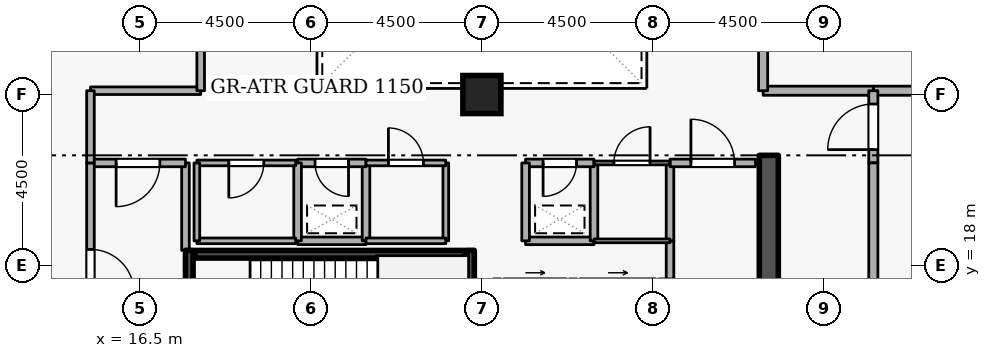
"""IFC4 building model, lengths in metres.
Left out: names, types, materials, properties, quantities, classifications, styles, units other than length and angle.
Written with IfcOpenShell. Run it as: python <this file> out.ifc"""

import sys

from ifc_helpers import new_model, si_unit, direction, frame, frame_2d, origin, origin_2d, place, context, subcontext, project, spatial, rectangle, extrude, element, fill, save


model = new_model("IFC4")
c1 = context("Model", 3, precision=1e-05, world=origin(), true_north=direction((0.0, 1.0)))
c2 = subcontext(c1, "Body", "Model", "MODEL_VIEW")
j1 = project(units=[si_unit("LENGTHUNIT", "METRE"), si_unit("PLANEANGLEUNIT", "RADIAN")], contexts=[c1])
p1 = place(None, origin())
s1 = spatial("IfcSite", under=j1, at=p1, CompositionType="ELEMENT")
p2 = place(p1, origin())
s2 = spatial("IfcBuilding", under=s1, at=p2, CompositionType="ELEMENT")
p3 = place(p2, frame((0.0, 0.0, 221.7)))
s3 = spatial("IfcBuildingStorey", under=s2, at=p3, CompositionType="ELEMENT", Elevation=221.7)
p4 = place(p3, frame((33.05, 15.1, 0.0), z_axis=(0.0, 0.0, 1.0), x_axis=(0.0, 1.0, 0.0)))
e1 = element("IfcWall", 1, at=p4, inside=s3, PredefinedType="SHEAR", context=c2, shape_type="SweptSolid", body=[
    extrude(rectangle(XDim=5.8, YDim=0.5, at=frame_2d((2.9, 0.0))), origin(), (0.0, 0.0, 1.0), 4.2),
])
p5 = place(p3, frame((25.5, 22.5, 0.0), z_axis=(0.0, 0.0, 1.0), x_axis=(1.0, 0.0, 0.0)))
e2 = element("IfcColumn", 2, at=p5, inside=s3, PredefinedType="COLUMN", context=c2, shape_type="SweptSolid", body=[
    extrude(rectangle(XDim=1.0, YDim=1.0, at=origin_2d()), origin(), (0.0, 0.0, 1.0), 4.2),
])
p6 = place(p3, frame((26.08, 17.55, 0.0), z_axis=(0.0, 0.0, 1.0), x_axis=(1.0, 0.0, 0.0)))
e3 = element("IfcWall", 3, at=p6, inside=s3, PredefinedType="STANDARD", context=c2, shape_type="SweptSolid", body=[
    extrude(rectangle(XDim=1.64, YDim=0.2, at=frame_2d((0.82, 0.0))), origin(), (0.0, 0.0, 1.0), 3.94),
])
p7 = place(p6, frame((0.31, 0.0, 0.0)))
e4 = element("IfcOpeningElement", 4, at=p7, cuts=e3, PredefinedType="OPENING", context=c2, shape_type="SweptSolid", body=[
    extrude(rectangle(XDim=1.02, YDim=2.06, at=frame_2d((0.51, 1.03))), frame((0.0, 0.11, 0.0), z_axis=(0.0, -1.0, 0.0), x_axis=(1.0, 0.0, 0.0)), (0.0, 0.0, 1.0), 0.22),
])
p8 = place(p3, frame((28.08, 17.55, 0.0), z_axis=(0.0, 0.0, 1.0), x_axis=(1.0, 0.0, 0.0)))
e5 = element("IfcWall", 5, at=p8, inside=s3, PredefinedType="STANDARD", context=c2, shape_type="SweptSolid", body=[
    extrude(rectangle(XDim=1.99, YDim=0.2, at=frame_2d((0.995, 0.0))), origin(), (0.0, 0.0, 1.0), 3.94),
])
p9 = place(p8, frame((0.485, 0.0, 0.0)))
e6 = element("IfcOpeningElement", 6, at=p9, cuts=e5, PredefinedType="OPENING", context=c2, shape_type="SweptSolid", body=[
    extrude(rectangle(XDim=1.02, YDim=2.06, at=frame_2d((0.51, 1.03))), frame((0.0, 0.11, 0.0), z_axis=(0.0, -1.0, 0.0), x_axis=(1.0, 0.0, 0.0)), (0.0, 0.0, 1.0), 0.22),
])
p10 = place(p3, frame((17.8, 15.05, 0.0), z_axis=(0.0, 0.0, 1.0), x_axis=(0.0, 1.0, 0.0)))
e7 = element("IfcWall", 7, at=p10, inside=s3, PredefinedType="SHEAR", context=c2, shape_type="SweptSolid", body=[
    extrude(rectangle(XDim=3.35, YDim=0.2, at=frame_2d((1.675, 0.0))), origin(), (0.0, 0.0, 1.0), 4.2),
])
p11 = place(p10, frame((1.125, 0.0, 0.0)))
e8 = element("IfcOpeningElement", 8, at=p11, cuts=e7, PredefinedType="OPENING", context=c2, shape_type="SweptSolid", body=[
    extrude(rectangle(XDim=1.1, YDim=2.1, at=frame_2d((0.55, 1.05))), frame((0.0, 0.11, 0.0), z_axis=(0.0, -1.0, 0.0), x_axis=(1.0, 0.0, 0.0)), (0.0, 0.0, 1.0), 0.22),
])
p12 = place(p3, frame((25.2, 18.4, 0.0), z_axis=(0.0, 0.0, 1.0), x_axis=(0.0, -1.0, 0.0)))
e9 = element("IfcWall", 9, at=p12, inside=s3, PredefinedType="SHEAR", context=c2, shape_type="SweptSolid", body=[
    extrude(rectangle(XDim=3.35, YDim=0.2, at=frame_2d((1.675, 0.0))), origin(), (0.0, 0.0, 1.0), 4.2),
])
p13 = place(p3, frame((25.05, 18.297, 0.0), z_axis=(0.0, 0.0, 1.0), x_axis=(-1.0, 0.0, 0.0)))
e10 = element("IfcWall", 10, at=p13, inside=s3, PredefinedType="SHEAR", context=c2, shape_type="SweptSolid", body=[
    extrude(rectangle(XDim=7.1, YDim=0.2, at=frame_2d((3.55, 0.0))), origin(), (0.0, 0.0, 1.0), 4.2),
])
p14 = place(p3, frame((17.7, 18.4, 0.0), z_axis=(0.0, 0.0, 1.0), x_axis=(0.0, 1.0, 0.0)))
e11 = element("IfcWall", 11, at=p14, inside=s3, PredefinedType="STANDARD", context=c2, shape_type="SweptSolid", body=[
    extrude(rectangle(XDim=2.3, YDim=0.2, at=frame_2d((1.15, 0.0))), origin(), (0.0, 0.0, 1.0), 3.145),
])
p15 = place(p3, frame((17.7, 20.7, 0.0), z_axis=(0.0, 0.0, 1.0), x_axis=(-1.0, 0.0, 0.0)))
e12 = element("IfcWall", 12, at=p15, inside=s3, PredefinedType="STANDARD", context=c2, shape_type="SweptSolid", body=[
    extrude(rectangle(XDim=2.5, YDim=0.2, at=frame_2d((1.25, 0.0))), origin(), (0.0, 0.0, 1.0), 3.94),
])
p16 = place(p15, frame((0.675, 0.0, 0.0)))
e13 = element("IfcOpeningElement", 13, at=p16, cuts=e12, PredefinedType="OPENING", context=c2, shape_type="SweptSolid", body=[
    extrude(rectangle(XDim=1.15, YDim=2.1, at=frame_2d((0.575, 1.05))), frame((0.0, 0.11, 0.0), z_axis=(0.0, -1.0, 0.0), x_axis=(1.0, 0.0, 0.0)), (0.0, 0.0, 1.0), 0.22),
])
p17 = place(p3, frame((15.2, 20.7, 0.0), z_axis=(0.0, 0.0, 1.0), x_axis=(0.0, -1.0, 0.0)))
e14 = element("IfcWall", 14, at=p17, inside=s3, PredefinedType="STANDARD", context=c2, shape_type="SweptSolid", body=[
    extrude(rectangle(XDim=5.7, YDim=0.2, at=frame_2d((2.85, 0.0))), origin(), (0.0, 0.0, 1.0), 3.94),
])
p18 = place(p17, frame((2.275, 0.0, 0.0)))
e15 = element("IfcOpeningElement", 15, at=p18, cuts=e14, PredefinedType="OPENING", context=c2, shape_type="SweptSolid", body=[
    extrude(rectangle(XDim=1.15, YDim=2.1, at=frame_2d((0.575, 1.05))), frame((0.0, 0.11, 0.0), z_axis=(0.0, -1.0, 0.0), x_axis=(1.0, 0.0, 0.0)), (0.0, 0.0, 1.0), 0.22),
])
p19 = place(p3, frame((26.65, 18.65, 0.0), z_axis=(0.0, 0.0, 1.0), x_axis=(1.0, 0.0, 0.0)))
e16 = element("IfcWall", 16, at=p19, inside=s3, PredefinedType="STANDARD", context=c2, shape_type="SweptSolid", body=[
    extrude(rectangle(XDim=1.8, YDim=0.2, at=frame_2d((0.9, 0.0))), origin(), (0.0, 0.0, 1.0), 3.94),
])
p20 = place(p3, frame((28.45, 18.65, 0.0), z_axis=(0.0, 0.0, 1.0), x_axis=(0.0, 1.0, 0.0)))
e17 = element("IfcWall", 17, at=p20, inside=s3, PredefinedType="STANDARD", context=c2, shape_type="SweptSolid", body=[
    extrude(rectangle(XDim=2.05, YDim=0.2, at=frame_2d((1.025, 0.0))), origin(), (0.0, 0.0, 1.0), 3.94),
])
p21 = place(p3, frame((28.45, 20.7, 0.0), z_axis=(0.0, 0.0, 1.0), x_axis=(-1.0, 0.0, 0.0)))
e18 = element("IfcWall", 18, at=p21, inside=s3, PredefinedType="STANDARD", context=c2, shape_type="SweptSolid", body=[
    extrude(rectangle(XDim=1.8, YDim=0.2, at=frame_2d((0.9, 0.0))), origin(), (0.0, 0.0, 1.0), 3.94),
])
p22 = place(p21, frame((0.46, 0.0, 0.0)))
e19 = element("IfcOpeningElement", 19, at=p22, cuts=e18, PredefinedType="OPENING", context=c2, shape_type="SweptSolid", body=[
    extrude(rectangle(XDim=0.88, YDim=2.04, at=frame_2d((0.44, 1.02))), frame((0.0, 0.11, 0.0), z_axis=(0.0, -1.0, 0.0), x_axis=(1.0, 0.0, 0.0)), (0.0, 0.0, 1.0), 0.22),
])
p23 = place(p3, frame((26.65, 20.7, 0.0), z_axis=(0.0, 0.0, 1.0), x_axis=(0.0, -1.0, 0.0)))
e20 = element("IfcWall", 20, at=p23, inside=s3, PredefinedType="STANDARD", context=c2, shape_type="SweptSolid", body=[
    extrude(rectangle(XDim=2.05, YDim=0.2, at=frame_2d((1.025, 0.0))), origin(), (0.0, 0.0, 1.0), 3.94),
])
p24 = place(p3, frame((20.65, 18.65, 0.0), z_axis=(0.0, 0.0, 1.0), x_axis=(1.0, 0.0, 0.0)))
e21 = element("IfcWall", 21, at=p24, inside=s3, PredefinedType="STANDARD", context=c2, shape_type="SweptSolid", body=[
    extrude(rectangle(XDim=1.8, YDim=0.2, at=frame_2d((0.9, 0.0))), origin(), (0.0, 0.0, 1.0), 3.94),
])
p25 = place(p3, frame((22.45, 18.65, 0.0), z_axis=(0.0, 0.0, 1.0), x_axis=(0.0, 1.0, 0.0)))
e22 = element("IfcWall", 22, at=p25, inside=s3, PredefinedType="STANDARD", context=c2, shape_type="SweptSolid", body=[
    extrude(rectangle(XDim=2.05, YDim=0.2, at=frame_2d((1.025, 0.0))), origin(), (0.0, 0.0, 1.0), 3.94),
])
p26 = place(p3, frame((22.45, 20.7, 0.0), z_axis=(0.0, 0.0, 1.0), x_axis=(-1.0, 0.0, 0.0)))
e23 = element("IfcWall", 23, at=p26, inside=s3, PredefinedType="STANDARD", context=c2, shape_type="SweptSolid", body=[
    extrude(rectangle(XDim=1.8, YDim=0.2, at=frame_2d((0.9, 0.0))), origin(), (0.0, 0.0, 1.0), 3.94),
])
p27 = place(p26, frame((0.46, 0.0, 0.0)))
e24 = element("IfcOpeningElement", 24, at=p27, cuts=e23, PredefinedType="OPENING", context=c2, shape_type="SweptSolid", body=[
    extrude(rectangle(XDim=0.88, YDim=2.04, at=frame_2d((0.44, 1.02))), frame((0.0, 0.11, 0.0), z_axis=(0.0, -1.0, 0.0), x_axis=(1.0, 0.0, 0.0)), (0.0, 0.0, 1.0), 0.22),
])
p28 = place(p3, frame((20.65, 20.7, 0.0), z_axis=(0.0, 0.0, 1.0), x_axis=(0.0, -1.0, 0.0)))
e25 = element("IfcWall", 25, at=p28, inside=s3, PredefinedType="STANDARD", context=c2, shape_type="SweptSolid", body=[
    extrude(rectangle(XDim=2.05, YDim=0.2, at=frame_2d((1.025, 0.0))), origin(), (0.0, 0.0, 1.0), 3.94),
])
p29 = place(p3, frame((30.45, 17.648, 0.0), z_axis=(0.0, 0.0, 1.0), x_axis=(0.0, 1.0, 0.0)))
e26 = element("IfcWall", 26, at=p29, inside=s3, PredefinedType="STANDARD", context=c2, shape_type="SweptSolid", body=[
    extrude(rectangle(XDim=1.002, YDim=0.2, at=frame_2d((0.501, 0.0))), origin(), (0.0, 0.0, 1.0), 3.94),
])
p30 = place(p3, frame((30.45, 18.65, 0.0), z_axis=(0.0, 0.0, 1.0), x_axis=(0.0, 1.0, 0.0)))
e27 = element("IfcWall", 27, at=p30, inside=s3, PredefinedType="STANDARD", context=c2, shape_type="SweptSolid", body=[
    extrude(rectangle(XDim=2.05, YDim=0.2, at=frame_2d((1.025, 0.0))), origin(), (0.0, 0.0, 1.0), 3.94),
])
p31 = place(p3, frame((30.45, 20.7, 0.0), z_axis=(0.0, 0.0, 1.0), x_axis=(1.0, 0.0, 0.0)))
e28 = element("IfcWall", 28, at=p31, inside=s3, PredefinedType="STANDARD", context=c2, shape_type="SweptSolid", body=[
    extrude(rectangle(XDim=2.25, YDim=0.2, at=frame_2d((1.125, 0.0))), origin(), (0.0, 0.0, 1.0), 3.94),
])
p32 = place(p31, frame((0.55, 0.0, 0.0)))
e29 = element("IfcOpeningElement", 29, at=p32, cuts=e28, PredefinedType="OPENING", context=c2, shape_type="SweptSolid", body=[
    extrude(rectangle(XDim=1.15, YDim=2.1, at=frame_2d((0.575, 1.05))), frame((0.0, 0.11, 0.0), z_axis=(0.0, -1.0, 0.0), x_axis=(1.0, 0.0, 0.0)), (0.0, 0.0, 1.0), 0.22),
])
p33 = place(p3, frame((39.55, 22.6, 0.0), z_axis=(0.0, 0.0, 1.0), x_axis=(-1.0, 0.0, 0.0)))
e30 = element("IfcWall", 30, at=p33, inside=s3, PredefinedType="STANDARD", context=c2, shape_type="SweptSolid", body=[
    extrude(rectangle(XDim=3.75, YDim=0.24, at=frame_2d((1.875, 0.0))), origin(), (0.0, 0.0, 1.0), 3.94),
])
p34 = place(p3, frame((35.8, 22.6, 0.0), z_axis=(0.0, 0.0, 1.0), x_axis=(-1.0, 0.0, 0.0)))
e31 = element("IfcWall", 31, at=p34, inside=s3, PredefinedType="STANDARD", context=c2, shape_type="SweptSolid", body=[
    extrude(rectangle(XDim=2.9, YDim=0.24, at=frame_2d((1.45, 0.0))), origin(), (0.0, 0.0, 1.0), 3.94),
])
p35 = place(p3, frame((32.9, 22.6, 0.0), z_axis=(0.0, 0.0, 1.0), x_axis=(0.0, 1.0, 0.0)))
e32 = element("IfcWall", 32, at=p35, inside=s3, PredefinedType="STANDARD", context=c2, shape_type="SweptSolid", body=[
    extrude(rectangle(XDim=5.12, YDim=0.24, at=frame_2d((2.56, 0.0))), origin(), (0.0, 0.0, 1.0), 3.145),
])
p36 = place(p3, frame((18.1, 22.6, 0.0), z_axis=(0.0, 0.0, 1.0), x_axis=(-1.0, 0.0, 0.0)))
e33 = element("IfcWall", 33, at=p36, inside=s3, PredefinedType="STANDARD", context=c2, shape_type="SweptSolid", body=[
    extrude(rectangle(XDim=2.9, YDim=0.2, at=frame_2d((1.45, 0.0))), origin(), (0.0, 0.0, 1.0), 3.94),
])
p37 = place(p3, frame((15.2, 22.6, 0.0), z_axis=(0.0, 0.0, 1.0), x_axis=(0.0, -1.0, 0.0)))
e34 = element("IfcWall", 34, at=p37, inside=s3, PredefinedType="STANDARD", context=c2, shape_type="SweptSolid", body=[
    extrude(rectangle(XDim=1.9, YDim=0.2, at=frame_2d((0.95, 0.0))), origin(), (0.0, 0.0, 1.0), 3.94),
])
p38 = place(p3, frame((18.1, 27.0, 0.0), z_axis=(0.0, 0.0, 1.0), x_axis=(0.0, -1.0, 0.0)))
e35 = element("IfcWall", 35, at=p38, inside=s3, PredefinedType="STANDARD", context=c2, shape_type="SweptSolid", body=[
    extrude(rectangle(XDim=4.4, YDim=0.2, at=frame_2d((2.2, 0.0))), origin(), (0.0, 0.0, 1.0), 3.145),
])
p39 = place(p3, frame((35.8, 20.7, 0.0), z_axis=(0.0, 0.0, 1.0), x_axis=(0.0, 1.0, 0.0)))
e36 = element("IfcWall", 36, at=p39, inside=s3, PredefinedType="STANDARD", context=c2, shape_type="SweptSolid", body=[
    extrude(rectangle(XDim=1.9, YDim=0.24, at=frame_2d((0.95, 0.0))), origin(), (0.0, 0.0, 1.0), 3.94),
])
p40 = place(p39, frame((0.35, 0.0, 0.0)))
e37 = element("IfcOpeningElement", 37, at=p40, cuts=e36, PredefinedType="OPENING", context=c2, shape_type="SweptSolid", body=[
    extrude(rectangle(XDim=1.2, YDim=2.1, at=frame_2d((0.6, 1.05))), frame((0.0, 0.13, 0.0), z_axis=(0.0, -1.0, 0.0), x_axis=(1.0, 0.0, 0.0)), (0.0, 0.0, 1.0), 0.26),
])
p41 = place(p3, frame((35.8, 15.2, 0.0), z_axis=(0.0, 0.0, 1.0), x_axis=(0.0, 1.0, 0.0)))
e38 = element("IfcWall", 38, at=p41, inside=s3, PredefinedType="STANDARD", context=c2, shape_type="SweptSolid", body=[
    extrude(rectangle(XDim=5.5, YDim=0.24, at=frame_2d((2.75, 0.0))), origin(), (0.0, 0.0, 1.0), 3.94),
])
p42 = place(p3, frame((18.0, 18.65, 0.0), z_axis=(0.0, 0.0, 1.0), x_axis=(1.0, 0.0, 0.0)))
e39 = element("IfcWall", 39, at=p42, inside=s3, PredefinedType="PARTITIONING", context=c2, shape_type="SweptSolid", body=[
    extrude(rectangle(XDim=2.6, YDim=0.15, at=frame_2d((1.3, 0.0))), origin(), (0.0, 0.0, 1.0), 3.94),
])
p43 = place(p3, frame((20.6, 20.7, 0.0), z_axis=(0.0, 0.0, 1.0), x_axis=(-1.0, 0.0, 0.0)))
e40 = element("IfcWall", 40, at=p43, inside=s3, PredefinedType="PARTITIONING", context=c2, shape_type="SweptSolid", body=[
    extrude(rectangle(XDim=2.6, YDim=0.15, at=frame_2d((1.3, 0.0))), origin(), (0.0, 0.0, 1.0), 3.94),
])
p44 = place(p43, frame((0.84, 0.0, 0.0)))
e41 = element("IfcOpeningElement", 41, at=p44, cuts=e40, PredefinedType="OPENING", context=c2, shape_type="SweptSolid", body=[
    extrude(rectangle(XDim=0.92, YDim=2.08, at=frame_2d((0.46, 1.04))), frame((0.0, 0.085, 0.0), z_axis=(0.0, -1.0, 0.0), x_axis=(1.0, 0.0, 0.0)), (0.0, 0.0, 1.0), 0.17),
])
p45 = place(p3, frame((18.0, 20.7, 0.0), z_axis=(0.0, 0.0, 1.0), x_axis=(0.0, -1.0, 0.0)))
e42 = element("IfcWall", 42, at=p45, inside=s3, PredefinedType="PARTITIONING", context=c2, shape_type="SweptSolid", body=[
    extrude(rectangle(XDim=2.05, YDim=0.15, at=frame_2d((1.025, 0.0))), origin(), (0.0, 0.0, 1.0), 3.145),
])
p46 = place(p3, frame((24.55, 20.7, 0.0), z_axis=(0.0, 0.0, 1.0), x_axis=(0.0, -1.0, 0.0)))
e43 = element("IfcWall", 43, at=p46, inside=s3, PredefinedType="PARTITIONING", context=c2, shape_type="SweptSolid", body=[
    extrude(rectangle(XDim=2.05, YDim=0.15, at=frame_2d((1.025, 0.0))), origin(), (0.0, 0.0, 1.0), 3.94),
])
p47 = place(p3, frame((24.55, 18.65, 0.0), z_axis=(0.0, 0.0, 1.0), x_axis=(-1.0, 0.0, 0.0)))
e44 = element("IfcWall", 44, at=p47, inside=s3, PredefinedType="PARTITIONING", context=c2, shape_type="SweptSolid", body=[
    extrude(rectangle(XDim=2.1, YDim=0.15, at=frame_2d((1.05, 0.0))), origin(), (0.0, 0.0, 1.0), 3.94),
])
p48 = place(p3, frame((22.45, 20.7, 0.0), z_axis=(0.0, 0.0, 1.0), x_axis=(1.0, 0.0, 0.0)))
e45 = element("IfcWall", 45, at=p48, inside=s3, PredefinedType="PARTITIONING", context=c2, shape_type="SweptSolid", body=[
    extrude(rectangle(XDim=2.1, YDim=0.15, at=frame_2d((1.05, 0.0))), origin(), (0.0, 0.0, 1.0), 3.94),
])
p49 = place(p48, frame((0.59, 0.0, 0.0)))
e46 = element("IfcOpeningElement", 46, at=p49, cuts=e45, PredefinedType="OPENING", context=c2, shape_type="SweptSolid", body=[
    extrude(rectangle(XDim=0.92, YDim=2.08, at=frame_2d((0.46, 1.04))), frame((0.0, 0.085, 0.0), z_axis=(0.0, -1.0, 0.0), x_axis=(1.0, 0.0, 0.0)), (0.0, 0.0, 1.0), 0.17),
])
p50 = place(p3, frame((30.45, 18.65, 0.0), z_axis=(0.0, 0.0, 1.0), x_axis=(-1.0, 0.0, 0.0)))
e47 = element("IfcWall", 47, at=p50, inside=s3, PredefinedType="PARTITIONING", context=c2, shape_type="SweptSolid", body=[
    extrude(rectangle(XDim=2.0, YDim=0.1, at=frame_2d((1.0, 0.0))), origin(), (0.0, 0.0, 1.0), 3.94),
])
p51 = place(p3, frame((28.45, 20.7, 0.0), z_axis=(0.0, 0.0, 1.0), x_axis=(1.0, 0.0, 0.0)))
e48 = element("IfcWall", 48, at=p51, inside=s3, PredefinedType="PARTITIONING", context=c2, shape_type="SweptSolid", body=[
    extrude(rectangle(XDim=2.0, YDim=0.1, at=frame_2d((1.0, 0.0))), origin(), (0.0, 0.0, 1.0), 3.94),
])
p52 = place(p51, frame((0.525, 0.0, 0.0)))
e49 = element("IfcOpeningElement", 49, at=p52, cuts=e48, PredefinedType="OPENING", context=c2, shape_type="SweptSolid", body=[
    extrude(rectangle(XDim=0.95, YDim=2.1, at=frame_2d((0.475, 1.05))), frame((0.0, 0.06, 0.0), z_axis=(0.0, -1.0, 0.0), x_axis=(1.0, 0.0, 0.0)), (0.0, 0.0, 1.0), 0.12),
])
p53 = place(p16, origin())
e50 = element("IfcDoor", 50, at=p53, inside=s3, OperationType="SINGLE_SWING_RIGHT", PredefinedType="DOOR", context=c2, shape_type="SweptSolid", body=[
    extrude(rectangle(XDim=1.15, YDim=2.1, at=frame_2d((0.575, 1.05))), frame((0.0, 0.025, 0.0), z_axis=(0.0, -1.0, 0.0), x_axis=(1.0, 0.0, 0.0)), (0.0, 0.0, 1.0), 0.05),
])
fill(e13, e50)
p54 = place(p22, origin())
e51 = element("IfcDoor", 51, at=p54, inside=s3, OperationType="SINGLE_SWING_RIGHT", PredefinedType="DOOR", context=c2, shape_type="SweptSolid", body=[
    extrude(rectangle(XDim=0.88, YDim=2.04, at=frame_2d((0.44, 1.02))), frame((0.0, 0.025, 0.0), z_axis=(0.0, -1.0, 0.0), x_axis=(1.0, 0.0, 0.0)), (0.0, 0.0, 1.0), 0.05),
])
fill(e19, e51)
p55 = place(p27, origin())
e52 = element("IfcDoor", 52, at=p55, inside=s3, OperationType="SINGLE_SWING_LEFT", PredefinedType="DOOR", context=c2, shape_type="SweptSolid", body=[
    extrude(rectangle(XDim=0.88, YDim=2.04, at=frame_2d((0.44, 1.02))), frame((0.0, 0.025, 0.0), z_axis=(0.0, -1.0, 0.0), x_axis=(1.0, 0.0, 0.0)), (0.0, 0.0, 1.0), 0.05),
])
fill(e24, e52)
p56 = place(p44, origin())
e53 = element("IfcDoor", 53, at=p56, inside=s3, OperationType="SINGLE_SWING_RIGHT", PredefinedType="DOOR", context=c2, shape_type="SweptSolid", body=[
    extrude(rectangle(XDim=0.92, YDim=2.08, at=frame_2d((0.46, 1.04))), frame((0.0, 0.025, 0.0), z_axis=(0.0, -1.0, 0.0), x_axis=(1.0, 0.0, 0.0)), (0.0, 0.0, 1.0), 0.05),
])
fill(e41, e53)
p57 = place(p49, origin())
e54 = element("IfcDoor", 54, at=p57, inside=s3, OperationType="SINGLE_SWING_LEFT", PredefinedType="DOOR", context=c2, shape_type="SweptSolid", body=[
    extrude(rectangle(XDim=0.92, YDim=2.08, at=frame_2d((0.46, 1.04))), frame((0.0, 0.025, 0.0), z_axis=(0.0, -1.0, 0.0), x_axis=(1.0, 0.0, 0.0)), (0.0, 0.0, 1.0), 0.05),
])
fill(e46, e54)
p58 = place(p52, origin())
e55 = element("IfcDoor", 55, at=p58, inside=s3, OperationType="SINGLE_SWING_RIGHT", PredefinedType="DOOR", context=c2, shape_type="SweptSolid", body=[
    extrude(rectangle(XDim=0.95, YDim=2.1, at=frame_2d((0.475, 1.05))), frame((0.0, 0.025, 0.0), z_axis=(0.0, -1.0, 0.0), x_axis=(1.0, 0.0, 0.0)), (0.0, 0.0, 1.0), 0.05),
])
fill(e49, e55)
p59 = place(p32, origin())
e56 = element("IfcDoor", 56, at=p59, inside=s3, OperationType="SINGLE_SWING_LEFT", PredefinedType="DOOR", context=c2, shape_type="SweptSolid", body=[
    extrude(rectangle(XDim=1.15, YDim=2.1, at=frame_2d((0.575, 1.05))), frame((0.0, 0.025, 0.0), z_axis=(0.0, -1.0, 0.0), x_axis=(1.0, 0.0, 0.0)), (0.0, 0.0, 1.0), 0.05),
])
fill(e29, e56)
p60 = place(p18, origin())
e57 = element("IfcDoor", 57, at=p60, inside=s3, OperationType="SINGLE_SWING_RIGHT", PredefinedType="DOOR", context=c2, shape_type="SweptSolid", body=[
    extrude(rectangle(XDim=1.15, YDim=2.1, at=frame_2d((0.575, 1.05))), frame((0.0, 0.025, 0.0), z_axis=(0.0, -1.0, 0.0), x_axis=(1.0, 0.0, 0.0)), (0.0, 0.0, 1.0), 0.05),
])
fill(e15, e57)
p61 = place(p40, origin())
e58 = element("IfcDoor", 58, at=p61, inside=s3, OperationType="SINGLE_SWING_LEFT", PredefinedType="DOOR", context=c2, shape_type="SweptSolid", body=[
    extrude(rectangle(XDim=1.2, YDim=2.1, at=frame_2d((0.6, 1.05))), frame((0.0, 0.025, 0.0), z_axis=(0.0, -1.0, 0.0), x_axis=(1.0, 0.0, 0.0)), (0.0, 0.0, 1.0), 0.05),
])
fill(e37, e58)
save(model, sys.argv[1])
